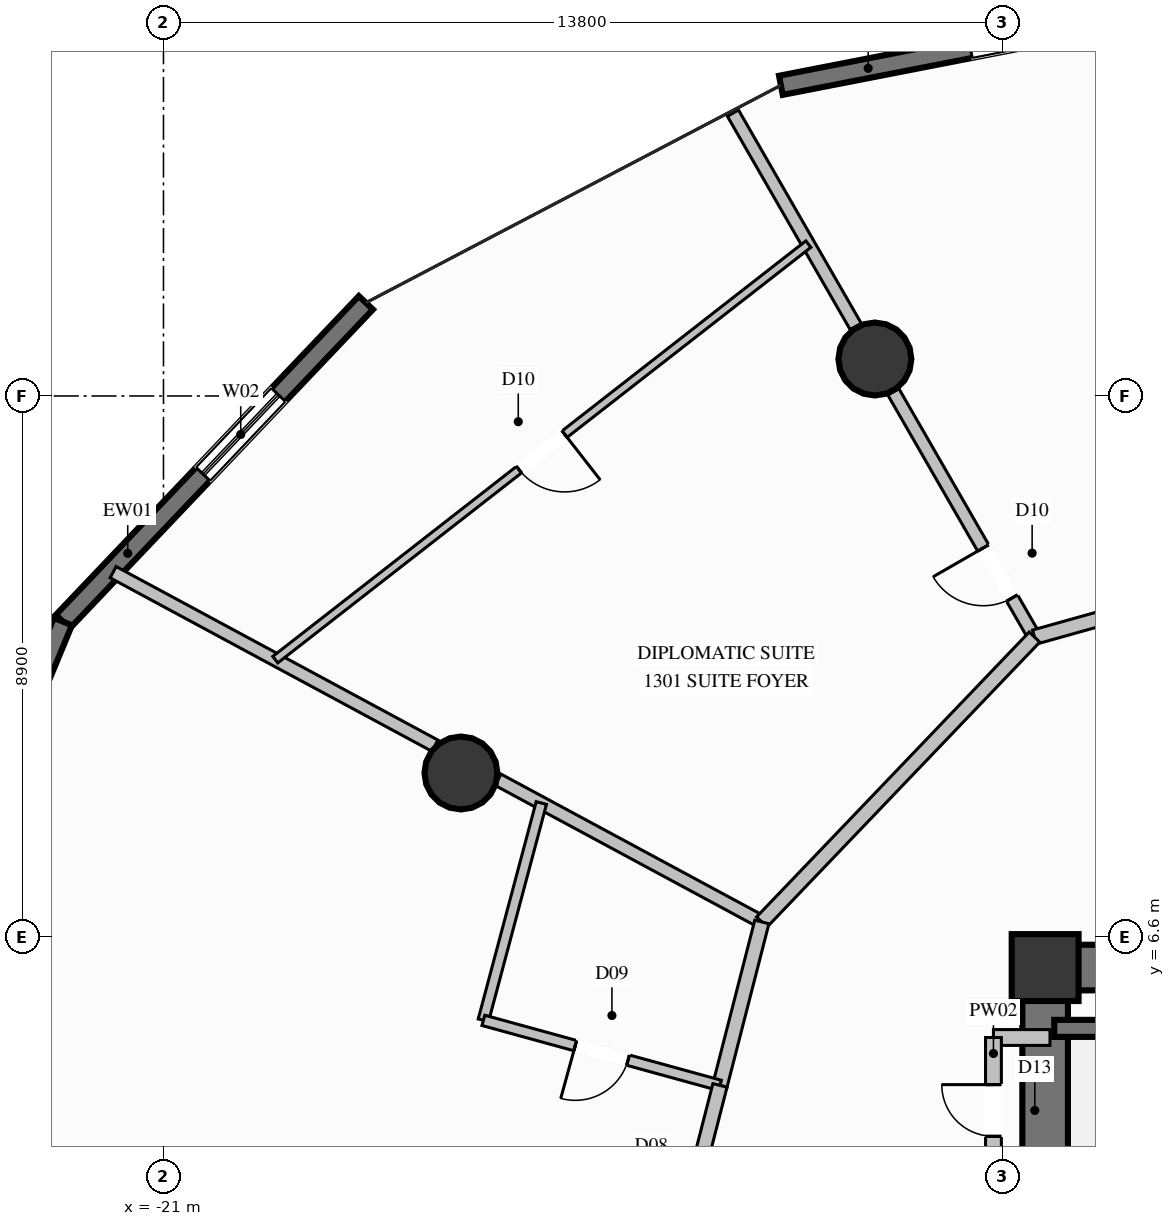
"""IFC4 building model, lengths in metres.
Left out: names, types, materials, properties, quantities, classifications, styles, units other than length and angle.
Written with IfcOpenShell. Run it as: python <this file> out.ifc"""

import sys

from ifc_helpers import new_model, si_unit, direction, frame, frame_2d, origin, origin_2d, place, context, subcontext, project, spatial, rectangle, circle, extrude, element, fill, save


model = new_model("IFC4")
c1 = context("Model", 3, precision=1e-05, world=origin(), true_north=direction((0.0, 1.0)))
c2 = subcontext(c1, "Body", "Model", "MODEL_VIEW")
j1 = project(units=[si_unit("LENGTHUNIT", "METRE"), si_unit("PLANEANGLEUNIT", "RADIAN")], contexts=[c1])
p1 = place(None, origin())
s1 = spatial("IfcSite", under=j1, at=p1, CompositionType="ELEMENT")
p2 = place(p1, origin())
s2 = spatial("IfcBuilding", under=s1, at=p2, CompositionType="ELEMENT")
p3 = place(p2, frame((0.0, 0.0, 50.0)))
s3 = spatial("IfcBuildingStorey", under=s2, at=p3, CompositionType="ELEMENT", Elevation=50.0)
p4 = place(p3, frame((-6.5, 6.1, 0.0), z_axis=(0.0, 0.0, 1.0), x_axis=(1.0, 0.0, 0.0)))
e1 = element("IfcColumn", 1, at=p4, inside=s3, PredefinedType="COLUMN", context=c2, shape_type="SweptSolid", body=[
    extrude(rectangle(XDim=1.1, YDim=1.1, at=origin_2d()), origin(), (0.0, 0.0, 1.0), 3.6),
])
p5 = place(p3, frame((-6.125, 6.1, 0.0), z_axis=(0.0, 0.0, 1.0), x_axis=(1.0, 0.0, 0.0)))
e2 = element("IfcWall", 2, at=p5, inside=s3, PredefinedType="SHEAR", context=c2, shape_type="SweptSolid", body=[
    extrude(rectangle(XDim=2.525, YDim=0.75, at=frame_2d((1.262, 0.0))), origin(), (0.0, 0.0, 1.0), 3.6),
])
p6 = place(p3, frame((-6.5, 2.35, 0.0), z_axis=(0.0, 0.0, 1.0), x_axis=(0.0, 1.0, 0.0)))
e3 = element("IfcWall", 3, at=p6, inside=s3, PredefinedType="SHEAR", context=c2, shape_type="SweptSolid", body=[
    extrude(rectangle(XDim=4.125, YDim=0.75, at=frame_2d((2.062, 0.0))), origin(), (0.0, 0.0, 1.0), 3.6),
])
for number, where, z_axis, x_axis in (
    (4, (-9.3, 16.108, 0.0), (0.0, 0.0, 1.0), (1.0, 0.0, 0.0)),
    (5, (-16.108, 9.3, 0.0), (0.0, 0.0, 1.0), (1.0, 0.0, 0.0)),
):
    element("IfcColumn", number, at=place(p3, frame(where, z_axis=z_axis, x_axis=x_axis)), inside=s3, PredefinedType="COLUMN", context=c2, shape_type="SweptSolid", body=[
        extrude(circle(Radius=0.6, at=origin_2d()), origin(), (0.0, 0.0, 1.0), 3.6),
    ])
p7 = place(p3, frame((-10.846, 20.609, 0.0), z_axis=(0.0, 0.0, 1.0), x_axis=(0.981529850993, 0.191309047382, 0.0)))
e6 = element("IfcWall", 6, at=p7, inside=s3, PredefinedType="SOLIDWALL", context=c2, shape_type="SweptSolid", body=[
    extrude(rectangle(XDim=8.15, YDim=0.32, at=frame_2d((4.075, 0.0))), origin(), (0.0, 0.0, 1.0), 3.34),
])
p8 = place(p7, frame((3.175, 0.0, 0.35)))
e7 = element("IfcOpeningElement", 7, at=p8, cuts=e6, PredefinedType="OPENING", context=c2, shape_type="SweptSolid", body=[
    extrude(rectangle(XDim=1.8, YDim=2.6, at=frame_2d((0.9, 1.3))), frame((0.0, 0.17, 0.0), z_axis=(0.0, -1.0, 0.0), x_axis=(1.0, 0.0, 0.0)), (0.0, 0.0, 1.0), 0.34),
])
p9 = place(p3, frame((-22.654, 11.79, 0.0), z_axis=(0.0, 0.0, 1.0), x_axis=(0.688922418365, 0.724835085708, 0.0)))
e8 = element("IfcWall", 8, at=p9, inside=s3, PredefinedType="SOLIDWALL", context=c2, shape_type="SweptSolid", body=[
    extrude(rectangle(XDim=7.233, YDim=0.32, at=frame_2d((3.617, 0.0))), origin(), (0.0, 0.0, 1.0), 3.34),
])
p10 = place(p9, frame((3.345, 0.0, 0.35)))
e9 = element("IfcOpeningElement", 9, at=p10, cuts=e8, PredefinedType="OPENING", context=c2, shape_type="SweptSolid", body=[
    extrude(rectangle(XDim=1.8, YDim=2.6, at=frame_2d((0.9, 1.3))), frame((0.0, 0.17, 0.0), z_axis=(0.0, -1.0, 0.0), x_axis=(1.0, 0.0, 0.0)), (0.0, 0.0, 1.0), 0.34),
])
p11 = place(p3, frame((-25.306, 5.392, 0.0), z_axis=(0.0, 0.0, 1.0), x_axis=(0.382897635177, 0.923790777707, 0.0)))
e10 = element("IfcWall", 10, at=p11, inside=s3, PredefinedType="SOLIDWALL", context=c2, shape_type="SweptSolid", body=[
    extrude(rectangle(XDim=6.926, YDim=0.32, at=frame_2d((3.463, 0.0))), origin(), (0.0, 0.0, 1.0), 3.34),
])
p12 = place(p11, frame((3.292, 0.0, 0.35)))
e11 = element("IfcOpeningElement", 11, at=p12, cuts=e10, PredefinedType="OPENING", context=c2, shape_type="SweptSolid", body=[
    extrude(rectangle(XDim=1.8, YDim=2.6, at=frame_2d((0.9, 1.3))), frame((0.0, 0.17, 0.0), z_axis=(0.0, -1.0, 0.0), x_axis=(1.0, 0.0, 0.0)), (0.0, 0.0, 1.0), 0.34),
])
p13 = place(p3, frame((-4.15, 5.1, 0.0), z_axis=(0.0, 0.0, 1.0), x_axis=(-1.0, 0.0, 0.0)))
e12 = element("IfcWall", 12, at=p13, inside=s3, PredefinedType="SOLIDWALL", context=c2, shape_type="SweptSolid", body=[
    extrude(rectangle(XDim=2.2, YDim=0.28, at=frame_2d((1.1, 0.0))), origin(), (0.0, 0.0, 1.0), 3.34),
])
p14 = place(p3, frame((-7.35, 4.95, 0.0), z_axis=(0.0, 0.0, 1.0), x_axis=(1.0, 0.0, 0.0)))
e13 = element("IfcWall", 13, at=p14, inside=s3, PredefinedType="PARTITIONING", context=c2, shape_type="SweptSolid", body=[
    extrude(rectangle(XDim=0.93, YDim=0.26, at=frame_2d((0.465, 0.0))), origin(), (0.0, 0.0, 1.0), 3.34),
])
p15 = place(p3, frame((-7.35, 2.55, 0.0), z_axis=(0.0, 0.0, 1.0), x_axis=(0.0, 1.0, 0.0)))
e14 = element("IfcWall", 14, at=p15, inside=s3, PredefinedType="PARTITIONING", context=c2, shape_type="SweptSolid", body=[
    extrude(rectangle(XDim=2.4, YDim=0.26, at=frame_2d((1.2, 0.0))), origin(), (0.0, 0.0, 1.0), 2.425),
])
p16 = place(p15, frame((0.775, 0.0, 0.0)))
e15 = element("IfcOpeningElement", 15, at=p16, cuts=e14, PredefinedType="OPENING", context=c2, shape_type="SweptSolid", body=[
    extrude(rectangle(XDim=0.85, YDim=2.05, at=frame_2d((0.425, 1.025))), frame((0.0, 0.14, 0.0), z_axis=(0.0, -1.0, 0.0), x_axis=(1.0, 0.0, 0.0)), (0.0, 0.0, 1.0), 0.28),
])
p17 = place(p3, frame((-6.675, 11.535, 0.0), z_axis=(0.0, 0.0, 1.0), x_axis=(-0.498786523098, 0.866724872365, 0.0)))
e16 = element("IfcWall", 16, at=p17, inside=s3, PredefinedType="PARTITIONING", context=c2, shape_type="SweptSolid", body=[
    extrude(rectangle(XDim=4.653, YDim=0.21, at=frame_2d((2.327, 0.0))), origin(), (0.0, 0.0, 1.0), 2.708),
])
p18 = place(p17, frame((0.741, 0.0, 0.0)))
e17 = element("IfcOpeningElement", 17, at=p18, cuts=e16, PredefinedType="OPENING", context=c2, shape_type="SweptSolid", body=[
    extrude(rectangle(XDim=0.95, YDim=2.1, at=frame_2d((0.475, 1.05))), frame((0.0, 0.115, 0.0), z_axis=(0.0, -1.0, 0.0), x_axis=(1.0, 0.0, 0.0)), (0.0, 0.0, 1.0), 0.23),
])
p19 = place(p3, frame((-9.615, 16.642, 0.0), z_axis=(0.0, 0.0, 1.0), x_axis=(-0.498747569817, 0.8667472882, 0.0)))
e18 = element("IfcWall", 18, at=p19, inside=s3, PredefinedType="PARTITIONING", context=c2, shape_type="SweptSolid", body=[
    extrude(rectangle(XDim=4.048, YDim=0.21, at=frame_2d((2.024, 0.0))), origin(), (0.0, 0.0, 1.0), 3.34),
])
p20 = place(p3, frame((-11.159, 6.85, 0.0), z_axis=(0.0, 0.0, 1.0), x_axis=(-0.880265861415, 0.47448078278, 0.0)))
e19 = element("IfcWall", 19, at=p20, inside=s3, PredefinedType="PARTITIONING", context=c2, shape_type="SweptSolid", body=[
    extrude(rectangle(XDim=4.929, YDim=0.21, at=frame_2d((2.465, 0.0))), origin(), (0.0, 0.0, 1.0), 2.708),
])
p21 = place(p3, frame((-16.536, 9.749, 0.0), z_axis=(0.0, 0.0, 1.0), x_axis=(-0.880228451762, 0.474550179336, 0.0)))
e20 = element("IfcWall", 20, at=p21, inside=s3, PredefinedType="PARTITIONING", context=c2, shape_type="SweptSolid", body=[
    extrude(rectangle(XDim=6.012, YDim=0.21, at=frame_2d((3.006, 0.0))), origin(), (0.0, 0.0, 1.0), 3.34),
])
p22 = place(p3, frame((-0.55, 13.25, 0.0), z_axis=(0.0, 0.0, 1.0), x_axis=(-0.962960431872, -0.269642738915, 0.0)))
e21 = element("IfcWall", 21, at=p22, inside=s3, PredefinedType="PARTITIONING", context=c2, shape_type="SweptSolid", body=[
    extrude(rectangle(XDim=6.361, YDim=0.24, at=frame_2d((3.18, 0.0))), origin(), (0.0, 0.0, 1.0), 2.919),
])
p23 = place(p3, frame((-6.675, 11.535, 0.0), z_axis=(0.0, 0.0, 1.0), x_axis=(-0.691444859665, -0.722429239471, 0.0)))
e22 = element("IfcWall", 22, at=p23, inside=s3, PredefinedType="PARTITIONING", context=c2, shape_type="SweptSolid", body=[
    extrude(rectangle(XDim=6.485, YDim=0.24, at=frame_2d((3.242, 0.0))), origin(), (0.0, 0.0, 1.0), 3.34),
])
p24 = place(p3, frame((-10.394, 17.997, 0.0), z_axis=(0.0, 0.0, 1.0), x_axis=(-0.788726154844, -0.614744705276, 0.0)))
e23 = element("IfcWall", 23, at=p24, inside=s3, PredefinedType="PARTITIONING", context=c2, shape_type="SweptSolid", body=[
    extrude(rectangle(XDim=11.115, YDim=0.135, at=frame_2d((5.558, 0.0))), origin(), (0.0, 0.0, 1.0), 3.34),
])
p25 = place(p24, frame((5.083, 0.0, 0.0)))
e24 = element("IfcOpeningElement", 24, at=p25, cuts=e23, PredefinedType="OPENING", context=c2, shape_type="SweptSolid", body=[
    extrude(rectangle(XDim=0.95, YDim=2.1, at=frame_2d((0.475, 1.05))), frame((0.0, 0.078, 0.0), z_axis=(0.0, -1.0, 0.0), x_axis=(1.0, 0.0, 0.0)), (0.0, 0.0, 1.0), 0.155),
])
p26 = place(p3, frame((-11.159, 6.85, 0.0), z_axis=(0.0, 0.0, 1.0), x_axis=(-0.248286444079, -0.968686658154, 0.0)))
e25 = element("IfcWall", 25, at=p26, inside=s3, PredefinedType="PARTITIONING", context=c2, shape_type="SweptSolid", body=[
    extrude(rectangle(XDim=2.775, YDim=0.24, at=frame_2d((1.387, 0.0))), origin(), (0.0, 0.0, 1.0), 3.34),
])
p27 = place(p3, frame((-14.786, 8.806, 0.0), z_axis=(0.0, 0.0, 1.0), x_axis=(-0.25767908302, -0.966230557462, 0.0)))
e26 = element("IfcWall", 26, at=p27, inside=s3, PredefinedType="PLUMBINGWALL", context=c2, shape_type="SweptSolid", body=[
    extrude(rectangle(XDim=3.699, YDim=0.175, at=frame_2d((1.85, 0.0))), origin(), (0.0, 0.0, 1.0), 3.34),
])
p28 = place(p3, frame((-11.848, 4.162, 0.0), z_axis=(0.0, 0.0, 1.0), x_axis=(-0.964220085246, 0.265103050166, 0.0)))
e27 = element("IfcWall", 27, at=p28, inside=s3, PredefinedType="PLUMBINGWALL", context=c2, shape_type="SweptSolid", body=[
    extrude(rectangle(XDim=4.035, YDim=0.175, at=frame_2d((2.018, 0.0))), origin(), (0.0, 0.0, 1.0), 3.34),
])
p29 = place(p28, frame((1.568, 0.0, 0.0)))
e28 = element("IfcOpeningElement", 28, at=p29, cuts=e27, PredefinedType="OPENING", context=c2, shape_type="SweptSolid", body=[
    extrude(rectangle(XDim=0.9, YDim=2.1, at=frame_2d((0.45, 1.05))), frame((0.0, 0.098, 0.0), z_axis=(0.0, -1.0, 0.0), x_axis=(1.0, 0.0, 0.0)), (0.0, 0.0, 1.0), 0.195),
])
p30 = place(p3, frame((-11.848, 4.162, 0.0), z_axis=(0.0, 0.0, 1.0), x_axis=(-0.248451984896, -0.968644212909, 0.0)))
e29 = element("IfcWall", 29, at=p30, inside=s3, PredefinedType="PARTITIONING", context=c2, shape_type="SweptSolid", body=[
    extrude(rectangle(XDim=3.832, YDim=0.24, at=frame_2d((1.916, 0.0))), origin(), (0.0, 0.0, 1.0), 3.34),
])
p31 = place(p30, frame((1.366, 0.0, 0.0)))
e30 = element("IfcOpeningElement", 30, at=p31, cuts=e29, PredefinedType="OPENING", context=c2, shape_type="SweptSolid", body=[
    extrude(rectangle(XDim=1.1, YDim=2.3, at=frame_2d((0.55, 1.15))), frame((0.0, 0.13, 0.0), z_axis=(0.0, -1.0, 0.0), x_axis=(1.0, 0.0, 0.0)), (0.0, 0.0, 1.0), 0.26),
])
p32 = place(p10, origin())
e31 = element("IfcWindow", 31, at=p32, inside=s3, PartitioningType="SINGLE_PANEL", PredefinedType="WINDOW", context=c2, shape_type="SweptSolid", body=[
    extrude(rectangle(XDim=1.8, YDim=2.6, at=frame_2d((0.9, 1.3))), frame((0.0, 0.03, 0.0), z_axis=(0.0, -1.0, 0.0), x_axis=(1.0, 0.0, 0.0)), (0.0, 0.0, 1.0), 0.06),
])
fill(e9, e31)
p33 = place(p16, origin())
e32 = element("IfcDoor", 32, at=p33, inside=s3, OperationType="SINGLE_SWING_RIGHT", PredefinedType="DOOR", context=c2, shape_type="SweptSolid", body=[
    extrude(rectangle(XDim=0.85, YDim=2.05, at=frame_2d((0.425, 1.025))), frame((0.0, 0.025, 0.0), z_axis=(0.0, -1.0, 0.0), x_axis=(1.0, 0.0, 0.0)), (0.0, 0.0, 1.0), 0.05),
])
fill(e15, e32)
p34 = place(p18, origin())
e33 = element("IfcDoor", 33, at=p34, inside=s3, OperationType="SINGLE_SWING_RIGHT", PredefinedType="DOOR", context=c2, shape_type="SweptSolid", body=[
    extrude(rectangle(XDim=0.95, YDim=2.1, at=frame_2d((0.475, 1.05))), frame((0.0, 0.025, 0.0), z_axis=(0.0, -1.0, 0.0), x_axis=(1.0, 0.0, 0.0)), (0.0, 0.0, 1.0), 0.05),
])
fill(e17, e33)
p35 = place(p25, origin())
e34 = element("IfcDoor", 34, at=p35, inside=s3, OperationType="SINGLE_SWING_LEFT", PredefinedType="DOOR", context=c2, shape_type="SweptSolid", body=[
    extrude(rectangle(XDim=0.95, YDim=2.1, at=frame_2d((0.475, 1.05))), frame((0.0, 0.025, 0.0), z_axis=(0.0, -1.0, 0.0), x_axis=(1.0, 0.0, 0.0)), (0.0, 0.0, 1.0), 0.05),
])
fill(e24, e34)
p36 = place(p29, origin())
e35 = element("IfcDoor", 35, at=p36, inside=s3, OperationType="SINGLE_SWING_RIGHT", PredefinedType="DOOR", context=c2, shape_type="SweptSolid", body=[
    extrude(rectangle(XDim=0.9, YDim=2.1, at=frame_2d((0.45, 1.05))), frame((0.0, 0.025, 0.0), z_axis=(0.0, -1.0, 0.0), x_axis=(1.0, 0.0, 0.0)), (0.0, 0.0, 1.0), 0.05),
])
fill(e28, e35)
save(model, sys.argv[1])
